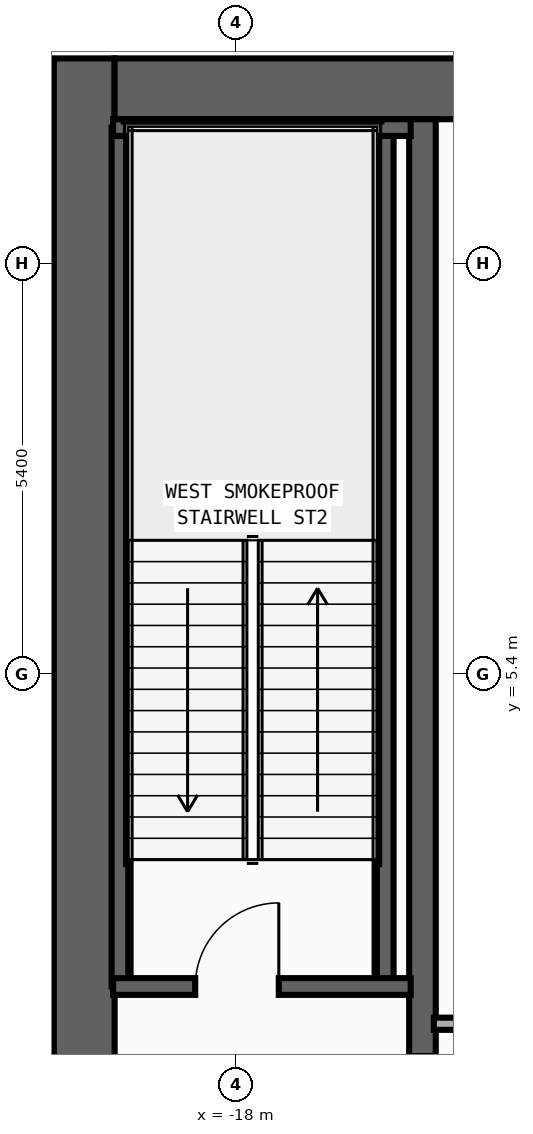
"""IFC4 building model, lengths in metres.
Left out: names, types, materials, properties, quantities, classifications, styles, units other than length and angle.
Written with IfcOpenShell. Run it as: python <this file> out.ifc"""

import sys

from ifc_helpers import new_model, si_unit, direction, frame, frame_2d, origin, place, context, subcontext, project, spatial, rectangle, extrude, element, fill, save


model = new_model("IFC4")
c1 = context("Model", 3, precision=1e-05, world=origin(), true_north=direction((0.0, 1.0)))
c2 = subcontext(c1, "Body", "Model", "MODEL_VIEW")
j1 = project(units=[si_unit("LENGTHUNIT", "METRE"), si_unit("PLANEANGLEUNIT", "RADIAN")], contexts=[c1])
p1 = place(None, origin())
s1 = spatial("IfcSite", under=j1, at=p1, CompositionType="ELEMENT")
p2 = place(p1, origin())
s2 = spatial("IfcBuilding", under=s1, at=p2, CompositionType="ELEMENT")
p3 = place(p2, origin())
s3 = spatial("IfcBuildingStorey", under=s2, at=p3, CompositionType="ELEMENT", Elevation=0.0)
p4 = place(p3, frame((-20.0, -13.5, 0.0), z_axis=(0.0, 0.0, 1.0), x_axis=(0.0, 1.0, 0.0)))
e1 = element("IfcWall", 1, at=p4, inside=s3, PredefinedType="SHEAR", context=c2, shape_type="SweptSolid", body=[
    extrude(rectangle(XDim=27.0, YDim=0.8, at=frame_2d((13.5, 0.0))), origin(), (0.0, 0.0, 1.0), 5.7),
])
p5 = place(p3, frame((-19.6, 13.1, 0.0), z_axis=(0.0, 0.0, 1.0), x_axis=(1.0, 0.0, 0.0)))
e2 = element("IfcWall", 2, at=p5, inside=s3, PredefinedType="SHEAR", context=c2, shape_type="SweptSolid", body=[
    extrude(rectangle(XDim=6.8, YDim=0.8, at=frame_2d((3.4, 0.0))), origin(), (0.0, 0.0, 1.0), 5.7),
])
p6 = place(p3, frame((-15.55, -12.7, 0.0), z_axis=(0.0, 0.0, 1.0), x_axis=(0.0, 1.0, 0.0)))
e3 = element("IfcWall", 3, at=p6, inside=s3, PredefinedType="SHEAR", context=c2, shape_type="SweptSolid", body=[
    extrude(rectangle(XDim=25.4, YDim=0.35, at=frame_2d((12.7, 0.0))), origin(), (0.0, 0.0, 1.0), 5.7),
])
p7 = place(p6, frame((11.925, 0.0, 0.0)))
e4 = element("IfcOpeningElement", 4, at=p7, cuts=e3, PredefinedType="OPENING", context=c2, shape_type="SweptSolid", body=[
    extrude(rectangle(XDim=1.15, YDim=2.2, at=frame_2d((0.575, 1.1))), frame((0.0, 0.185, 0.0), z_axis=(0.0, -1.0, 0.0), x_axis=(1.0, 0.0, 0.0)), (0.0, 0.0, 1.0), 0.37),
])
p8 = place(p6, frame((0.825, 0.0, 0.0)))
e5 = element("IfcOpeningElement", 5, at=p8, cuts=e3, PredefinedType="OPENING", context=c2, shape_type="SweptSolid", body=[
    extrude(rectangle(XDim=0.85, YDim=2.1, at=frame_2d((0.425, 1.05))), frame((0.0, 0.185, 0.0), z_axis=(0.0, -1.0, 0.0), x_axis=(1.0, 0.0, 0.0)), (0.0, 0.0, 1.0), 0.37),
])
for number, where, z_axis, x_axis in (
    (6, (-16.04, 1.29, 0.0), (0.0, 0.0, 1.0), (0.0, 1.0, 0.0)),
    (7, (-19.53, 1.29, 0.0), (0.0, 0.0, 1.0), (0.0, 1.0, 0.0)),
):
    element("IfcWall", number, at=place(p3, frame(where, z_axis=z_axis, x_axis=x_axis)), inside=s3, PredefinedType="SHEAR", context=c2, shape_type="SweptSolid", body=[
        extrude(rectangle(XDim=11.3, YDim=0.22, at=frame_2d((5.65, 0.0))), origin(), (0.0, 0.0, 1.0), 5.7),
    ])
p9 = place(p3, frame((-19.62, 12.59, 0.0), z_axis=(0.0, 0.0, 1.0), x_axis=(1.0, 0.0, 0.0)))
e8 = element("IfcWall", 8, at=p9, inside=s3, PredefinedType="SHEAR", context=c2, shape_type="SweptSolid", body=[
    extrude(rectangle(XDim=3.915, YDim=0.22, at=frame_2d((1.958, 0.0))), origin(), (0.0, 0.0, 1.0), 5.7),
])
p10 = place(p3, frame((-19.62, 1.29, 0.0), z_axis=(0.0, 0.0, 1.0), x_axis=(1.0, 0.0, 0.0)))
e9 = element("IfcWall", 9, at=p10, inside=s3, PredefinedType="SHEAR", context=c2, shape_type="SweptSolid", body=[
    extrude(rectangle(XDim=3.915, YDim=0.22, at=frame_2d((1.958, 0.0))), origin(), (0.0, 0.0, 1.0), 5.7),
])
p11 = place(p10, frame((1.08, 0.0, 0.0)))
e10 = element("IfcOpeningElement", 10, at=p11, cuts=e9, PredefinedType="OPENING", context=c2, shape_type="SweptSolid", body=[
    extrude(rectangle(XDim=1.1, YDim=2.2, at=frame_2d((0.55, 1.1))), frame((0.0, 0.12, 0.0), z_axis=(0.0, -1.0, 0.0), x_axis=(1.0, 0.0, 0.0)), (0.0, 0.0, 1.0), 0.24),
])
p12 = place(p3, frame((-15.4, 0.8, 0.0), z_axis=(0.0, 0.0, 1.0), x_axis=(1.0, 0.0, 0.0)))
e11 = element("IfcWall", 11, at=p12, inside=s3, PredefinedType="STANDARD", context=c2, shape_type="SweptSolid", body=[
    extrude(rectangle(XDim=2.6, YDim=0.16, at=frame_2d((1.3, 0.0))), origin(), (0.0, 0.0, 1.0), 5.7),
])
p13 = place(p11, origin())
e12 = element("IfcDoor", 12, at=p13, inside=s3, OperationType="SINGLE_SWING_RIGHT", PredefinedType="DOOR", context=c2, shape_type="SweptSolid", body=[
    extrude(rectangle(XDim=1.1, YDim=2.2, at=frame_2d((0.55, 1.1))), frame((0.0, 0.025, 0.0), z_axis=(0.0, -1.0, 0.0), x_axis=(1.0, 0.0, 0.0)), (0.0, 0.0, 1.0), 0.05),
])
fill(e10, e12)
save(model, sys.argv[1])
